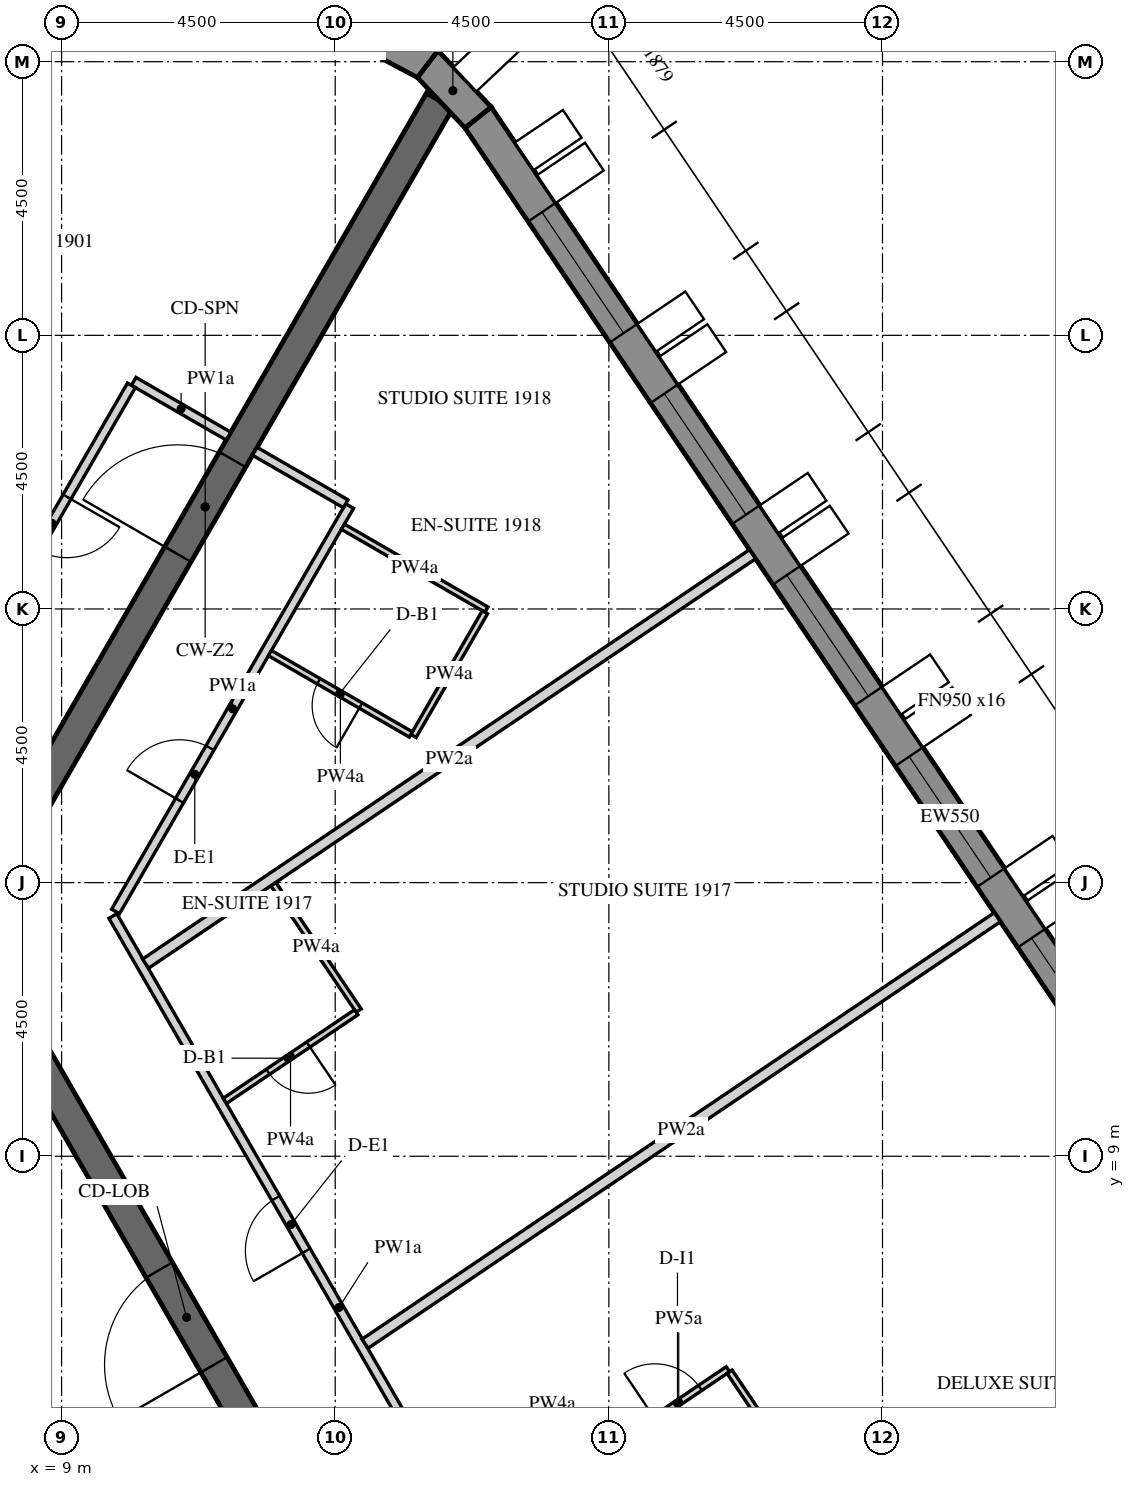
"""IFC4 building model, lengths in metres.
Left out: names, types, materials, properties, quantities, classifications, styles, units other than length and angle.
Written with IfcOpenShell. Run it as: python <this file> out.ifc"""

import sys

from ifc_helpers import new_model, si_unit, direction, frame, frame_2d, origin, place, context, subcontext, project, spatial, polyline, rectangle, outline, extrude, element, fill, save


model = new_model("IFC4")
c1 = context("Model", 3, precision=1e-05, world=origin(), true_north=direction((0.0, 1.0)))
c2 = subcontext(c1, "Body", "Model", "MODEL_VIEW")
j1 = project(units=[si_unit("LENGTHUNIT", "METRE"), si_unit("PLANEANGLEUNIT", "RADIAN")], contexts=[c1])
p1 = place(None, origin())
s1 = spatial("IfcSite", under=j1, at=p1, CompositionType="ELEMENT")
p2 = place(p1, origin())
s2 = spatial("IfcBuilding", under=s1, at=p2, CompositionType="ELEMENT")
p3 = place(p2, frame((0.0, 0.0, 238.5)))
s3 = spatial("IfcBuildingStorey", under=s2, at=p3, CompositionType="ELEMENT", Elevation=238.5)
p4 = place(p3, frame((31.371, 3.071, -0.15), z_axis=(0.0, 0.0, 1.0), x_axis=(-0.559189891278, 0.829039604297, 0.0)))
e1 = element("IfcWall", 1, at=p4, inside=s3, PredefinedType="SOLIDWALL", context=c2, shape_type="SweptSolid", body=[
    extrude(outline(polyline([(-0.026, -0.275), (27.781, -0.275), (27.736, 0.275), (0.026, 0.275), (-0.026, -0.275)])), origin(), (0.0, 0.0, 1.0), 3.9),
])
p5 = place(p4, frame((1.879, 0.0, 1.05)))
e2 = element("IfcOpeningElement", 2, at=p5, cuts=e1, PredefinedType="OPENING", context=c2, shape_type="SweptSolid", body=[
    extrude(rectangle(XDim=2.4, YDim=2.4, at=frame_2d((1.2, 1.2))), frame((0.0, 0.285, 0.0), z_axis=(0.0, -1.0, 0.0), x_axis=(1.0, 0.0, 0.0)), (0.0, 0.0, 1.0), 0.57),
])
p6 = place(p4, frame((5.479, 0.0, 1.05)))
e3 = element("IfcOpeningElement", 3, at=p6, cuts=e1, PredefinedType="OPENING", context=c2, shape_type="SweptSolid", body=[
    extrude(rectangle(XDim=2.4, YDim=2.4, at=frame_2d((1.2, 1.2))), frame((0.0, 0.285, 0.0), z_axis=(0.0, -1.0, 0.0), x_axis=(1.0, 0.0, 0.0)), (0.0, 0.0, 1.0), 0.57),
])
p7 = place(p4, frame((9.079, 0.0, 1.05)))
e4 = element("IfcOpeningElement", 4, at=p7, cuts=e1, PredefinedType="OPENING", context=c2, shape_type="SweptSolid", body=[
    extrude(rectangle(XDim=2.4, YDim=2.4, at=frame_2d((1.2, 1.2))), frame((0.0, 0.285, 0.0), z_axis=(0.0, -1.0, 0.0), x_axis=(1.0, 0.0, 0.0)), (0.0, 0.0, 1.0), 0.57),
])
p8 = place(p4, frame((12.679, 0.0, 1.05)))
e5 = element("IfcOpeningElement", 5, at=p8, cuts=e1, PredefinedType="OPENING", context=c2, shape_type="SweptSolid", body=[
    extrude(rectangle(XDim=2.4, YDim=2.4, at=frame_2d((1.2, 1.2))), frame((0.0, 0.285, 0.0), z_axis=(0.0, -1.0, 0.0), x_axis=(1.0, 0.0, 0.0)), (0.0, 0.0, 1.0), 0.57),
])
p9 = place(p4, frame((16.279, 0.0, 1.05)))
e6 = element("IfcOpeningElement", 6, at=p9, cuts=e1, PredefinedType="OPENING", context=c2, shape_type="SweptSolid", body=[
    extrude(rectangle(XDim=2.4, YDim=2.4, at=frame_2d((1.2, 1.2))), frame((0.0, 0.285, 0.0), z_axis=(0.0, -1.0, 0.0), x_axis=(1.0, 0.0, 0.0)), (0.0, 0.0, 1.0), 0.57),
])
p10 = place(p4, frame((19.879, 0.0, 1.05)))
e7 = element("IfcOpeningElement", 7, at=p10, cuts=e1, PredefinedType="OPENING", context=c2, shape_type="SweptSolid", body=[
    extrude(rectangle(XDim=2.4, YDim=2.4, at=frame_2d((1.2, 1.2))), frame((0.0, 0.285, 0.0), z_axis=(0.0, -1.0, 0.0), x_axis=(1.0, 0.0, 0.0)), (0.0, 0.0, 1.0), 0.57),
])
p11 = place(p4, frame((23.479, 0.0, 1.05)))
e8 = element("IfcOpeningElement", 8, at=p11, cuts=e1, PredefinedType="OPENING", context=c2, shape_type="SweptSolid", body=[
    extrude(rectangle(XDim=2.4, YDim=2.4, at=frame_2d((1.2, 1.2))), frame((0.0, 0.285, 0.0), z_axis=(0.0, -1.0, 0.0), x_axis=(1.0, 0.0, 0.0)), (0.0, 0.0, 1.0), 0.57),
])
p12 = place(p3, frame((15.849, 26.083, -0.15), z_axis=(0.0, 0.0, 1.0), x_axis=(-0.686196220404, 0.727416488061, 0.0)))
e9 = element("IfcWall", 9, at=p12, inside=s3, PredefinedType="SOLIDWALL", context=c2, shape_type="SweptSolid", body=[
    extrude(outline(polyline([(-0.022, -0.275), (1.253, -0.275), (1.163, 0.275), (0.022, 0.275), (-0.022, -0.275)])), origin(), (0.0, 0.0, 1.0), 3.9),
])
p13 = place(p3, frame((15.02, 26.962, -0.15), z_axis=(0.0, 0.0, 1.0), x_axis=(-0.882950818639, 0.469465495926, 0.0)))
e10 = element("IfcWall", 10, at=p13, inside=s3, PredefinedType="SOLIDWALL", context=c2, shape_type="SweptSolid", body=[
    extrude(outline(polyline([(-0.045, -0.275), (1.253, -0.275), (1.163, 0.275), (0.045, 0.275), (-0.045, -0.275)])), origin(), (0.0, 0.0, 1.0), 3.9),
])
p14 = place(p3, frame((14.722, 0.0, -0.15), z_axis=(0.0, 0.0, 1.0), x_axis=(-0.50000571537, 0.866022103989, 0.0)))
e11 = element("IfcWall", 11, at=p14, inside=s3, PredefinedType="SHEAR", context=c2, shape_type="SweptSolid", body=[
    extrude(outline(polyline([(-0.144, -0.25), (14.867, -0.25), (14.578, 0.25), (0.144, 0.25), (-0.144, -0.25)])), origin(), (0.0, 0.0, 1.0), 3.9),
])
p15 = place(p14, frame((6.432, 0.0, 0.15)))
e12 = element("IfcOpeningElement", 12, at=p15, cuts=e11, PredefinedType="OPENING", context=c2, shape_type="SweptSolid", body=[
    extrude(rectangle(XDim=1.8, YDim=2.4, at=frame_2d((0.9, 1.2))), frame((0.0, 0.26, 0.0), z_axis=(0.0, -1.0, 0.0), x_axis=(1.0, 0.0, 0.0)), (0.0, 0.0, 1.0), 0.52),
])
p16 = place(p3, frame((7.506, 13.0, -0.15), z_axis=(0.0, 0.0, 1.0), x_axis=(0.499988271576, 0.866032175087, 0.0)))
e13 = element("IfcWall", 13, at=p16, inside=s3, PredefinedType="SHEAR", context=c2, shape_type="SweptSolid", body=[
    extrude(rectangle(XDim=15.424, YDim=0.5, at=frame_2d((7.712, 0.0))), origin(), (0.0, 0.0, 1.0), 3.9),
])
p17 = place(p16, frame((6.812, 0.0, 0.15)))
e14 = element("IfcOpeningElement", 14, at=p17, cuts=e13, PredefinedType="OPENING", context=c2, shape_type="SweptSolid", body=[
    extrude(rectangle(XDim=1.8, YDim=2.4, at=frame_2d((0.9, 1.2))), frame((0.0, 0.26, 0.0), z_axis=(0.0, -1.0, 0.0), x_axis=(1.0, 0.0, 0.0)), (0.0, 0.0, 1.0), 0.52),
])
p18 = place(p3, frame((11.345, 0.0, -0.15), z_axis=(0.0, 0.0, 1.0), x_axis=(-0.499995046907, 0.866028263435, 0.0)))
e15 = element("IfcWall", 15, at=p18, inside=s3, PredefinedType="SHEAR", context=c2, shape_type="SweptSolid", body=[
    extrude(outline(polyline([(-0.101, -0.175), (11.446, -0.175), (11.244, 0.175), (0.101, 0.175), (-0.101, -0.175)])), origin(), (0.0, 0.0, 1.0), 3.9),
])
p19 = place(p18, frame((4.744, 0.0, 0.15)))
e16 = element("IfcOpeningElement", 16, at=p19, cuts=e15, PredefinedType="OPENING", context=c2, shape_type="SweptSolid", body=[
    extrude(rectangle(XDim=1.8, YDim=2.4, at=frame_2d((0.9, 1.2))), frame((0.0, 0.185, 0.0), z_axis=(0.0, -1.0, 0.0), x_axis=(1.0, 0.0, 0.0)), (0.0, 0.0, 1.0), 0.37),
])
p20 = place(p3, frame((11.745, 20.843, 0.0), z_axis=(0.0, 0.0, 1.0), x_axis=(-0.865989075817, 0.500062916607, 0.0)))
e17 = element("IfcWall", 17, at=p20, inside=s3, PredefinedType="PARTITIONING", context=c2, shape_type="SweptSolid", body=[
    extrude(rectangle(XDim=1.8, YDim=0.15, at=frame_2d((0.9, 0.0))), origin(), (0.0, 0.0, 1.0), 2.838),
])
p21 = place(p3, frame((10.149, 21.678, 0.0), z_axis=(0.0, 0.0, 1.0), x_axis=(-0.500020076982, -0.866013812023, 0.0)))
e18 = element("IfcWall", 18, at=p21, inside=s3, PredefinedType="PARTITIONING", context=c2, shape_type="SweptSolid", body=[
    extrude(rectangle(XDim=7.361, YDim=0.15, at=frame_2d((3.681, 0.0))), origin(), (0.0, 0.0, 1.0), 2.838),
])
p22 = place(p21, frame((2.118, 0.0, 0.0)))
e19 = element("IfcOpeningElement", 19, at=p22, cuts=e18, PredefinedType="OPENING", context=c2, shape_type="SweptSolid", body=[
    extrude(rectangle(XDim=1.0, YDim=2.1, at=frame_2d((0.5, 1.05))), frame((0.0, 0.085, 0.0), z_axis=(0.0, -1.0, 0.0), x_axis=(1.0, 0.0, 0.0)), (0.0, 0.0, 1.0), 0.17),
])
p23 = place(p3, frame((17.277, 0.075, 0.0), z_axis=(0.0, 0.0, 1.0), x_axis=(-0.499998228944, 0.866026426302, 0.0)))
e20 = element("IfcWall", 20, at=p23, inside=s3, PredefinedType="PARTITIONING", context=c2, shape_type="SweptSolid", body=[
    extrude(rectangle(XDim=14.867, YDim=0.15, at=frame_2d((7.433, 0.0))), origin(), (0.0, 0.0, 1.0), 2.838),
])
p24 = place(p23, frame((4.345, 0.0, 0.0)))
e21 = element("IfcOpeningElement", 21, at=p24, cuts=e20, PredefinedType="OPENING", context=c2, shape_type="SweptSolid", body=[
    extrude(rectangle(XDim=1.0, YDim=2.1, at=frame_2d((0.5, 1.05))), frame((0.0, 0.085, 0.0), z_axis=(0.0, -1.0, 0.0), x_axis=(1.0, 0.0, 0.0)), (0.0, 0.0, 1.0), 0.17),
])
p25 = place(p23, frame((8.51, 0.0, 0.0)))
e22 = element("IfcOpeningElement", 22, at=p25, cuts=e20, PredefinedType="OPENING", context=c2, shape_type="SweptSolid", body=[
    extrude(rectangle(XDim=1.0, YDim=2.1, at=frame_2d((0.5, 1.05))), frame((0.0, 0.085, 0.0), z_axis=(0.0, -1.0, 0.0), x_axis=(1.0, 0.0, 0.0)), (0.0, 0.0, 1.0), 0.17),
])
p26 = place(p3, frame((9.887, 13.025, 0.0), z_axis=(0.0, 0.0, 1.0), x_axis=(0.499985955615, 0.866033512162, 0.0)))
e23 = element("IfcWall", 23, at=p26, inside=s3, PredefinedType="PARTITIONING", context=c2, shape_type="SweptSolid", body=[
    extrude(rectangle(XDim=7.699, YDim=0.15, at=frame_2d((3.85, 0.0))), origin(), (0.0, 0.0, 1.0), 2.838),
])
p27 = place(p26, frame((2.106, 0.0, 0.0)))
e24 = element("IfcOpeningElement", 24, at=p27, cuts=e23, PredefinedType="OPENING", context=c2, shape_type="SweptSolid", body=[
    extrude(rectangle(XDim=1.0, YDim=2.1, at=frame_2d((0.5, 1.05))), frame((0.0, 0.085, 0.0), z_axis=(0.0, -1.0, 0.0), x_axis=(1.0, 0.0, 0.0)), (0.0, 0.0, 1.0), 0.17),
])
p28 = place(p3, frame((13.672, 19.73, 0.0), z_axis=(0.0, 0.0, 1.0), x_axis=(-0.866074815912, 0.499914405916, 0.0)))
e25 = element("IfcWall", 25, at=p28, inside=s3, PredefinedType="PARTITIONING", context=c2, shape_type="SweptSolid", body=[
    extrude(rectangle(XDim=1.725, YDim=0.15, at=frame_2d((0.862, 0.0))), origin(), (0.0, 0.0, 1.0), 2.838),
])
p29 = place(p3, frame((18.341, 4.407, 0.0), z_axis=(0.0, 0.0, 1.0), x_axis=(0.829014089772, 0.559227716552, 0.0)))
e26 = element("IfcWall", 26, at=p29, inside=s3, PredefinedType="PARTITIONING", context=c2, shape_type="SweptSolid", body=[
    extrude(rectangle(XDim=1.95, YDim=0.1, at=frame_2d((0.975, 0.0))), origin(), (0.0, 0.0, 1.0), 2.838),
])
p30 = place(p29, frame((0.5, 0.0, 0.0)))
e27 = element("IfcOpeningElement", 27, at=p30, cuts=e26, PredefinedType="OPENING", context=c2, shape_type="SweptSolid", body=[
    extrude(rectangle(XDim=0.9, YDim=2.1, at=frame_2d((0.45, 1.05))), frame((0.0, 0.06, 0.0), z_axis=(0.0, -1.0, 0.0), x_axis=(1.0, 0.0, 0.0)), (0.0, 0.0, 1.0), 0.12),
])
p31 = place(p3, frame((19.986, 5.456, 0.0), z_axis=(0.0, 0.0, 1.0), x_axis=(0.559223037199, -0.829017246302, 0.0)))
e28 = element("IfcWall", 28, at=p31, inside=s3, PredefinedType="PARTITIONING", context=c2, shape_type="SweptSolid", body=[
    extrude(rectangle(XDim=2.35, YDim=0.1, at=frame_2d((1.175, 0.0))), origin(), (0.0, 0.0, 1.0), 2.838),
])
p32 = place(p3, frame((24.389, 12.931, 0.0), z_axis=(0.0, 0.0, 1.0), x_axis=(-0.829040439793, -0.559188652593, 0.0)))
e29 = element("IfcWall", 29, at=p32, inside=s3, PredefinedType="PARTITIONING", context=c2, shape_type="SweptSolid", body=[
    extrude(rectangle(XDim=12.542, YDim=0.18, at=frame_2d((6.271, 0.0))), origin(), (0.0, 0.0, 1.0), 2.838),
])
p33 = place(p3, frame((12.483, 13.476, 0.0), z_axis=(0.0, 0.0, 1.0), x_axis=(0.559203861497, -0.829030181168, 0.0)))
e30 = element("IfcWall", 30, at=p33, inside=s3, PredefinedType="PARTITIONING", context=c2, shape_type="SweptSolid", body=[
    extrude(rectangle(XDim=2.51, YDim=0.1, at=frame_2d((1.255, 0.0))), origin(), (0.0, 0.0, 1.0), 2.838),
])
p34 = place(p3, frame((13.845, 11.367, 0.0), z_axis=(0.0, 0.0, 1.0), x_axis=(-0.829068087245, -0.55914766092, 0.0)))
e31 = element("IfcWall", 31, at=p34, inside=s3, PredefinedType="PARTITIONING", context=c2, shape_type="SweptSolid", body=[
    extrude(rectangle(XDim=2.605, YDim=0.1, at=frame_2d((1.302, 0.0))), origin(), (0.0, 0.0, 1.0), 2.838),
])
p35 = place(p34, frame((0.95, 0.0, 0.0)))
e32 = element("IfcOpeningElement", 32, at=p35, cuts=e31, PredefinedType="OPENING", context=c2, shape_type="SweptSolid", body=[
    extrude(rectangle(XDim=0.8, YDim=2.1, at=frame_2d((0.4, 1.05))), frame((0.0, 0.06, 0.0), z_axis=(0.0, -1.0, 0.0), x_axis=(1.0, 0.0, 0.0)), (0.0, 0.0, 1.0), 0.12),
])
p36 = place(p3, frame((20.363, 18.9, 0.0), z_axis=(0.0, 0.0, 1.0), x_axis=(-0.829027307641, -0.559208121531, 0.0)))
e33 = element("IfcWall", 33, at=p36, inside=s3, PredefinedType="PARTITIONING", context=c2, shape_type="SweptSolid", body=[
    extrude(rectangle(XDim=12.039, YDim=0.18, at=frame_2d((6.02, 0.0))), origin(), (0.0, 0.0, 1.0), 2.838),
])
p37 = place(p3, frame((13.627, 19.352, 0.0), z_axis=(0.0, 0.0, 1.0), x_axis=(0.866012511928, -0.500022328685, 0.0)))
e34 = element("IfcWall", 34, at=p37, inside=s3, PredefinedType="PARTITIONING", context=c2, shape_type="SweptSolid", body=[
    extrude(rectangle(XDim=2.725, YDim=0.1, at=frame_2d((1.363, 0.0))), origin(), (0.0, 0.0, 1.0), 2.838),
])
p38 = place(p3, frame((15.962, 17.947, 0.0), z_axis=(0.0, 0.0, 1.0), x_axis=(-0.500016218704, -0.866016039709, 0.0)))
e35 = element("IfcWall", 35, at=p38, inside=s3, PredefinedType="PARTITIONING", context=c2, shape_type="SweptSolid", body=[
    extrude(rectangle(XDim=2.35, YDim=0.1, at=frame_2d((1.175, 0.0))), origin(), (0.0, 0.0, 1.0), 2.838),
])
p39 = place(p3, frame((14.743, 15.936, 0.0), z_axis=(0.0, 0.0, 1.0), x_axis=(-0.86604424267, 0.499967368674, 0.0)))
e36 = element("IfcWall", 36, at=p39, inside=s3, PredefinedType="PARTITIONING", context=c2, shape_type="SweptSolid", body=[
    extrude(rectangle(XDim=2.675, YDim=0.1, at=frame_2d((1.337, 0.0))), origin(), (0.0, 0.0, 1.0), 2.838),
])
p40 = place(p39, frame((0.95, 0.0, 0.0)))
e37 = element("IfcOpeningElement", 37, at=p40, cuts=e36, PredefinedType="OPENING", context=c2, shape_type="SweptSolid", body=[
    extrude(rectangle(XDim=0.8, YDim=2.1, at=frame_2d((0.4, 1.05))), frame((0.0, 0.06, 0.0), z_axis=(0.0, -1.0, 0.0), x_axis=(1.0, 0.0, 0.0)), (0.0, 0.0, 1.0), 0.12),
])
p41 = place(p7, frame((0.0, 0.205, 0.0)))
e38 = element("IfcWindow", 38, at=p41, inside=s3, PartitioningType="DOUBLE_PANEL_VERTICAL", PredefinedType="WINDOW", context=c2, shape_type="SweptSolid", body=[
    extrude(rectangle(XDim=2.4, YDim=2.4, at=frame_2d((1.2, 1.2))), frame((0.0, 0.03, 0.0), z_axis=(0.0, -1.0, 0.0), x_axis=(1.0, 0.0, 0.0)), (0.0, 0.0, 1.0), 0.06),
])
fill(e4, e38)
p42 = place(p8, frame((0.0, 0.205, 0.0)))
e39 = element("IfcWindow", 39, at=p42, inside=s3, PartitioningType="DOUBLE_PANEL_VERTICAL", PredefinedType="WINDOW", context=c2, shape_type="SweptSolid", body=[
    extrude(rectangle(XDim=2.4, YDim=2.4, at=frame_2d((1.2, 1.2))), frame((0.0, 0.03, 0.0), z_axis=(0.0, -1.0, 0.0), x_axis=(1.0, 0.0, 0.0)), (0.0, 0.0, 1.0), 0.06),
])
fill(e5, e39)
p43 = place(p9, frame((0.0, 0.205, 0.0)))
e40 = element("IfcWindow", 40, at=p43, inside=s3, PartitioningType="DOUBLE_PANEL_VERTICAL", PredefinedType="WINDOW", context=c2, shape_type="SweptSolid", body=[
    extrude(rectangle(XDim=2.4, YDim=2.4, at=frame_2d((1.2, 1.2))), frame((0.0, 0.03, 0.0), z_axis=(0.0, -1.0, 0.0), x_axis=(1.0, 0.0, 0.0)), (0.0, 0.0, 1.0), 0.06),
])
fill(e6, e40)
p44 = place(p10, frame((0.0, 0.205, 0.0)))
e41 = element("IfcWindow", 41, at=p44, inside=s3, PartitioningType="DOUBLE_PANEL_VERTICAL", PredefinedType="WINDOW", context=c2, shape_type="SweptSolid", body=[
    extrude(rectangle(XDim=2.4, YDim=2.4, at=frame_2d((1.2, 1.2))), frame((0.0, 0.03, 0.0), z_axis=(0.0, -1.0, 0.0), x_axis=(1.0, 0.0, 0.0)), (0.0, 0.0, 1.0), 0.06),
])
fill(e7, e41)
p45 = place(p11, frame((0.0, 0.205, 0.0)))
e42 = element("IfcWindow", 42, at=p45, inside=s3, PartitioningType="DOUBLE_PANEL_VERTICAL", PredefinedType="WINDOW", context=c2, shape_type="SweptSolid", body=[
    extrude(rectangle(XDim=2.4, YDim=2.4, at=frame_2d((1.2, 1.2))), frame((0.0, 0.03, 0.0), z_axis=(0.0, -1.0, 0.0), x_axis=(1.0, 0.0, 0.0)), (0.0, 0.0, 1.0), 0.06),
])
fill(e8, e42)
p46 = place(p15, origin())
e43 = element("IfcDoor", 43, at=p46, inside=s3, OperationType="DOUBLE_DOOR_SINGLE_SWING", PredefinedType="DOOR", context=c2, shape_type="SweptSolid", body=[
    extrude(rectangle(XDim=1.8, YDim=2.4, at=frame_2d((0.9, 1.2))), frame((0.0, 0.025, 0.0), z_axis=(0.0, -1.0, 0.0), x_axis=(1.0, 0.0, 0.0)), (0.0, 0.0, 1.0), 0.05),
])
fill(e12, e43)
p47 = place(p17, origin())
e44 = element("IfcDoor", 44, at=p47, inside=s3, OperationType="DOUBLE_DOOR_SINGLE_SWING", PredefinedType="DOOR", context=c2, shape_type="SweptSolid", body=[
    extrude(rectangle(XDim=1.8, YDim=2.4, at=frame_2d((0.9, 1.2))), frame((0.0, 0.025, 0.0), z_axis=(0.0, -1.0, 0.0), x_axis=(1.0, 0.0, 0.0)), (0.0, 0.0, 1.0), 0.05),
])
fill(e14, e44)
p48 = place(p19, origin())
e45 = element("IfcDoor", 45, at=p48, inside=s3, OperationType="DOUBLE_DOOR_SINGLE_SWING", PredefinedType="DOOR", context=c2, shape_type="SweptSolid", body=[
    extrude(rectangle(XDim=1.8, YDim=2.4, at=frame_2d((0.9, 1.2))), frame((0.0, 0.025, 0.0), z_axis=(0.0, -1.0, 0.0), x_axis=(1.0, 0.0, 0.0)), (0.0, 0.0, 1.0), 0.05),
])
fill(e16, e45)
p49 = place(p22, origin())
e46 = element("IfcDoor", 46, at=p49, inside=s3, OperationType="SINGLE_SWING_LEFT", PredefinedType="DOOR", context=c2, shape_type="SweptSolid", body=[
    extrude(rectangle(XDim=1.0, YDim=2.1, at=frame_2d((0.5, 1.05))), frame((0.0, 0.025, 0.0), z_axis=(0.0, -1.0, 0.0), x_axis=(1.0, 0.0, 0.0)), (0.0, 0.0, 1.0), 0.05),
])
fill(e19, e46)
p50 = place(p30, origin())
e47 = element("IfcDoor", 47, at=p50, inside=s3, OperationType="SINGLE_SWING_RIGHT", PredefinedType="DOOR", context=c2, shape_type="SweptSolid", body=[
    extrude(rectangle(XDim=0.9, YDim=2.1, at=frame_2d((0.45, 1.05))), frame((0.0, 0.025, 0.0), z_axis=(0.0, -1.0, 0.0), x_axis=(1.0, 0.0, 0.0)), (0.0, 0.0, 1.0), 0.05),
])
fill(e27, e47)
p51 = place(p25, origin())
e48 = element("IfcDoor", 48, at=p51, inside=s3, OperationType="SINGLE_SWING_RIGHT", PredefinedType="DOOR", context=c2, shape_type="SweptSolid", body=[
    extrude(rectangle(XDim=1.0, YDim=2.1, at=frame_2d((0.5, 1.05))), frame((0.0, 0.025, 0.0), z_axis=(0.0, -1.0, 0.0), x_axis=(1.0, 0.0, 0.0)), (0.0, 0.0, 1.0), 0.05),
])
fill(e22, e48)
p52 = place(p35, origin())
e49 = element("IfcDoor", 49, at=p52, inside=s3, OperationType="SINGLE_SWING_LEFT", PredefinedType="DOOR", context=c2, shape_type="SweptSolid", body=[
    extrude(rectangle(XDim=0.8, YDim=2.1, at=frame_2d((0.4, 1.05))), frame((0.0, 0.025, 0.0), z_axis=(0.0, -1.0, 0.0), x_axis=(1.0, 0.0, 0.0)), (0.0, 0.0, 1.0), 0.05),
])
fill(e32, e49)
p53 = place(p27, origin())
e50 = element("IfcDoor", 50, at=p53, inside=s3, OperationType="SINGLE_SWING_RIGHT", PredefinedType="DOOR", context=c2, shape_type="SweptSolid", body=[
    extrude(rectangle(XDim=1.0, YDim=2.1, at=frame_2d((0.5, 1.05))), frame((0.0, 0.025, 0.0), z_axis=(0.0, -1.0, 0.0), x_axis=(1.0, 0.0, 0.0)), (0.0, 0.0, 1.0), 0.05),
])
fill(e24, e50)
p54 = place(p40, origin())
e51 = element("IfcDoor", 51, at=p54, inside=s3, OperationType="SINGLE_SWING_RIGHT", PredefinedType="DOOR", context=c2, shape_type="SweptSolid", body=[
    extrude(rectangle(XDim=0.8, YDim=2.1, at=frame_2d((0.4, 1.05))), frame((0.0, 0.025, 0.0), z_axis=(0.0, -1.0, 0.0), x_axis=(1.0, 0.0, 0.0)), (0.0, 0.0, 1.0), 0.05),
])
fill(e37, e51)
save(model, sys.argv[1])
